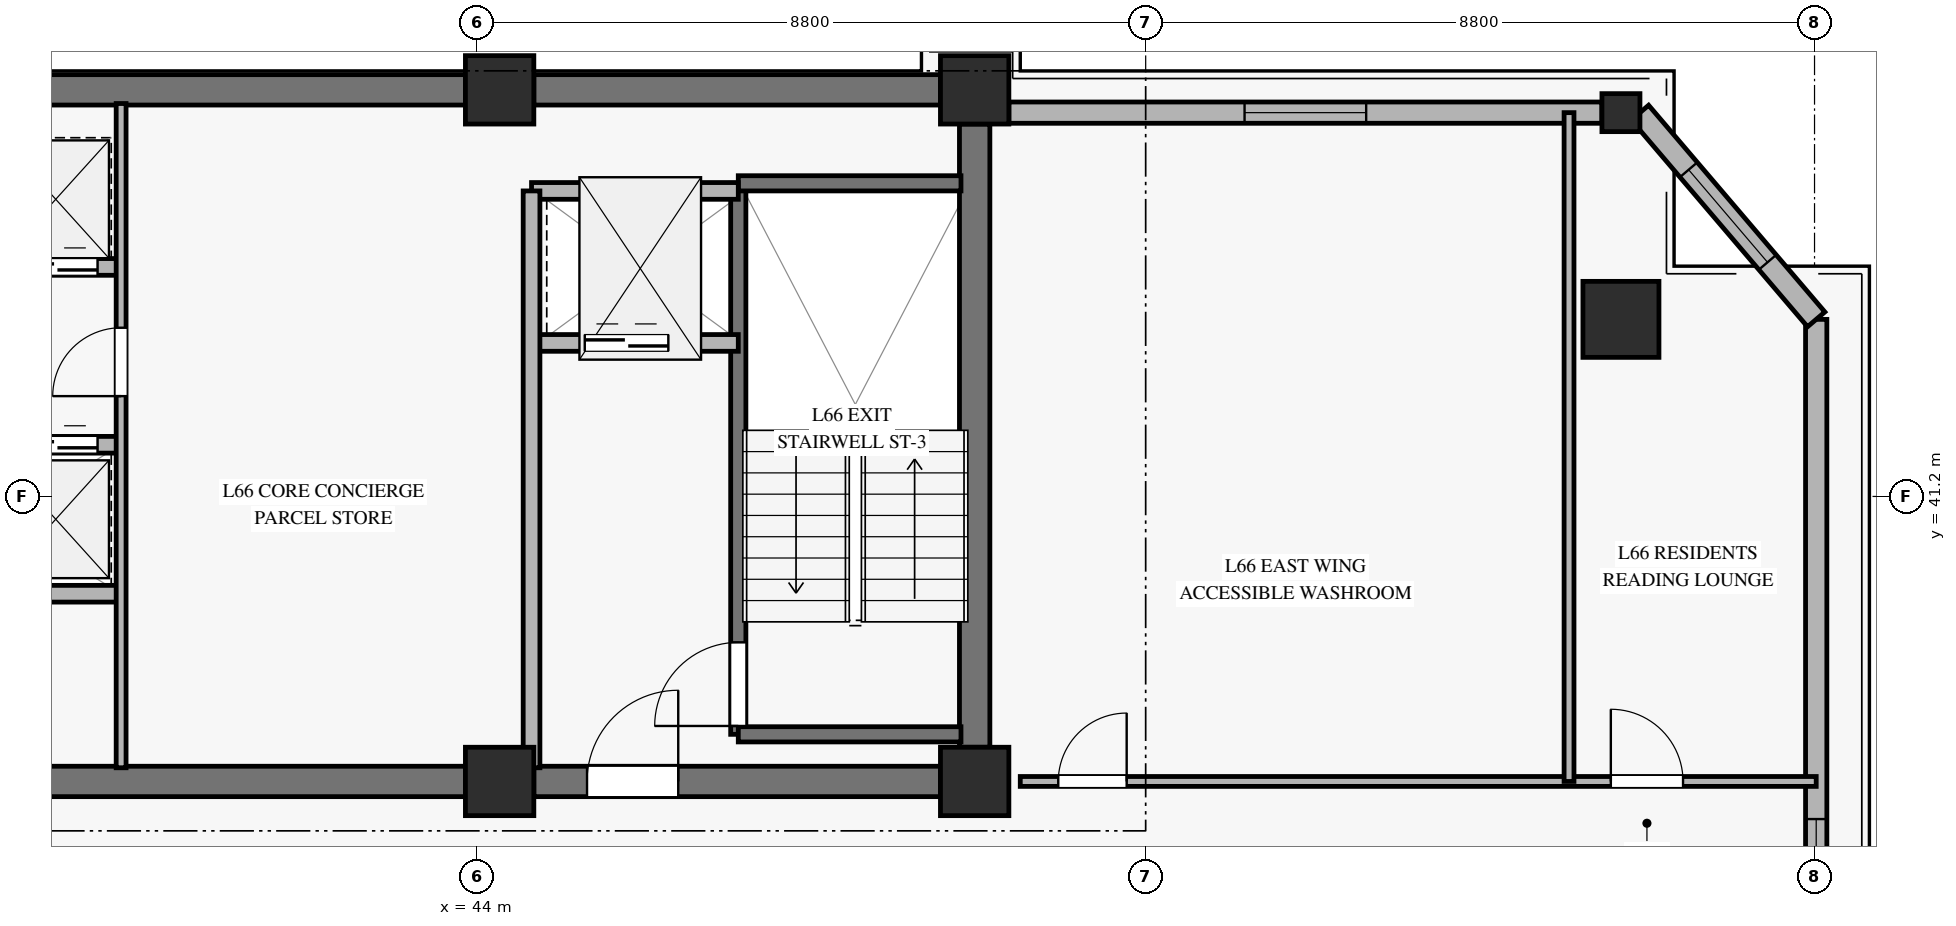
"""IFC4 building model, lengths in metres.
Left out: names, types, materials, properties, quantities, classifications, styles, units other than length and angle.
Written with IfcOpenShell. Run it as: python <this file> out.ifc"""

import sys

from ifc_helpers import new_model, si_unit, direction, frame, frame_2d, origin, origin_2d, place, context, subcontext, project, spatial, rectangle, hollow_rectangle, extrude, source, transform, mapped, element, fill, save


model = new_model("IFC4")
c1 = context("Model", 3, precision=1e-05, world=origin(), true_north=direction((0.0, 1.0)))
c2 = subcontext(c1, "Body", "Model", "MODEL_VIEW")
j1 = project(units=[si_unit("LENGTHUNIT", "METRE"), si_unit("PLANEANGLEUNIT", "RADIAN")], contexts=[c1])
p1 = place(None, origin())
s1 = spatial("IfcSite", under=j1, at=p1, CompositionType="ELEMENT")
p2 = place(p1, origin())
s2 = spatial("IfcBuilding", under=s1, at=p2, CompositionType="ELEMENT")
p3 = place(p2, frame((0.0, 0.0, 258.7)))
s3 = spatial("IfcBuildingStorey", under=s2, at=p3, CompositionType="ELEMENT", Elevation=258.7)
m1 = source(origin(), c2, "Body", "SweptSolid", [
    extrude(rectangle(XDim=0.9, YDim=0.9, at=origin_2d()), origin(), (0.0, 0.0, 1.0), 3.185),
])
for number, where, z_axis, x_axis in (
    (1, (44.3, 37.45, 0.0), (0.0, 0.0, 1.0), (1.0, 0.0, 0.0)),
    (2, (44.3, 46.55, 0.0), (0.0, 0.0, 1.0), (1.0, 0.0, 0.0)),
    (3, (50.55, 37.45, 0.0), (0.0, 0.0, 1.0), (1.0, 0.0, 0.0)),
    (4, (50.55, 46.55, 0.0), (0.0, 0.0, 1.0), (1.0, 0.0, 0.0)),
):
    element("IfcColumn", number, at=place(p3, frame(where, z_axis=z_axis, x_axis=x_axis)), inside=s3, PredefinedType="PILASTER", context=c2, shape_type="MappedRepresentation", body=[
        mapped(m1, transform((0.0, 0.0, 0.0), x_axis=(1.0, 0.0, 0.0), y_axis=(0.0, 1.0, 0.0), z_axis=(0.0, 0.0, 1.0), scale=1.0)),
    ])
p4 = place(p3, frame((36.05, 46.55, 0.0), z_axis=(0.0, 0.0, 1.0), x_axis=(1.0, 0.0, 0.0)))
e5 = element("IfcWall", 5, at=p4, inside=s3, PredefinedType="SHEAR", context=c2, shape_type="SweptSolid", body=[
    extrude(rectangle(XDim=7.8, YDim=0.4, at=frame_2d((3.9, 0.0))), origin(), (0.0, 0.0, 1.0), 3.185),
])
p5 = place(p3, frame((44.75, 46.55, 0.0), z_axis=(0.0, 0.0, 1.0), x_axis=(1.0, 0.0, 0.0)))
e6 = element("IfcWall", 6, at=p5, inside=s3, PredefinedType="SHEAR", context=c2, shape_type="SweptSolid", body=[
    extrude(rectangle(XDim=5.35, YDim=0.4, at=frame_2d((2.675, 0.0))), origin(), (0.0, 0.0, 1.0), 3.185),
])
p6 = place(p3, frame((36.05, 37.45, 0.0), z_axis=(0.0, 0.0, 1.0), x_axis=(1.0, 0.0, 0.0)))
e7 = element("IfcWall", 7, at=p6, inside=s3, PredefinedType="SHEAR", context=c2, shape_type="SweptSolid", body=[
    extrude(rectangle(XDim=7.8, YDim=0.4, at=frame_2d((3.9, 0.0))), origin(), (0.0, 0.0, 1.0), 3.185),
])
p7 = place(p3, frame((44.75, 37.45, 0.0), z_axis=(0.0, 0.0, 1.0), x_axis=(1.0, 0.0, 0.0)))
e8 = element("IfcWall", 8, at=p7, inside=s3, PredefinedType="SHEAR", context=c2, shape_type="SweptSolid", body=[
    extrude(rectangle(XDim=5.35, YDim=0.4, at=frame_2d((2.675, 0.0))), origin(), (0.0, 0.0, 1.0), 3.185),
])
p8 = place(p7, frame((0.7, 0.0, 0.0)))
e9 = element("IfcOpeningElement", 9, at=p8, cuts=e8, PredefinedType="OPENING", context=c2, shape_type="SweptSolid", body=[
    extrude(rectangle(XDim=1.2, YDim=2.15, at=frame_2d((0.6, 1.075))), frame((0.0, 0.21, 0.0), z_axis=(0.0, -1.0, 0.0), x_axis=(1.0, 0.0, 0.0)), (0.0, 0.0, 1.0), 0.42),
])
p9 = place(p3, frame((50.55, 37.9, 0.0), z_axis=(0.0, 0.0, 1.0), x_axis=(0.0, 1.0, 0.0)))
e10 = element("IfcWall", 10, at=p9, inside=s3, PredefinedType="SHEAR", context=c2, shape_type="SweptSolid", body=[
    extrude(rectangle(XDim=8.2, YDim=0.4, at=frame_2d((4.1, 0.0))), origin(), (0.0, 0.0, 1.0), 3.185),
])
m2 = source(origin(), c2, "Body", "SweptSolid", [
    extrude(hollow_rectangle(XDim=1.0, YDim=1.0, WallThickness=0.045, at=origin_2d()), origin(), (0.0, 0.0, 1.0), 3.185),
])
p10 = place(p3, frame((59.053, 43.53, 0.0), z_axis=(0.0, 0.0, 1.0), x_axis=(1.0, 0.0, 0.0)))
e11 = element("IfcColumn", 11, at=p10, inside=s3, PredefinedType="COLUMN", context=c2, shape_type="MappedRepresentation", body=[
    mapped(m2, transform((0.0, 0.0, 0.0), x_axis=(1.0, 0.0, 0.0), y_axis=(0.0, 1.0, 0.0), z_axis=(0.0, 0.0, 1.0), scale=1.0)),
])
m3 = source(origin(), c2, "Body", "SweptSolid", [
    extrude(hollow_rectangle(XDim=0.5, YDim=0.5, WallThickness=0.024, at=origin_2d()), origin(), (0.0, 0.0, 1.0), 3.185),
])
p11 = place(p3, frame((59.053, 46.25, 0.0), z_axis=(0.0, 0.0, 1.0), x_axis=(1.0, 0.0, 0.0)))
e12 = element("IfcColumn", 12, at=p11, inside=s3, PredefinedType="COLUMN", context=c2, shape_type="MappedRepresentation", body=[
    mapped(m3, transform((0.0, 0.0, 0.0), x_axis=(1.0, 0.0, 0.0), y_axis=(0.0, 1.0, 0.0), z_axis=(0.0, 0.0, 1.0), scale=1.0)),
])
p12 = place(p3, frame((61.622, 31.322, 0.0), z_axis=(0.0, 0.0, 1.0), x_axis=(0.0, 1.0, 0.0)))
e13 = element("IfcWall", 13, at=p12, inside=s3, PredefinedType="SOLIDWALL", context=c2, shape_type="SweptSolid", body=[
    extrude(rectangle(XDim=12.208, YDim=0.28, at=frame_2d((6.104, 0.0))), origin(), (0.0, 0.0, 1.0), 2.815),
])
p13 = place(p12, frame((4.033, 0.0, 0.45)))
e14 = element("IfcOpeningElement", 14, at=p13, cuts=e13, PredefinedType="OPENING", context=c2, shape_type="SweptSolid", body=[
    extrude(rectangle(XDim=1.6, YDim=2.0, at=frame_2d((0.8, 1.0))), frame((0.0, 0.15, 0.0), z_axis=(0.0, -1.0, 0.0), x_axis=(1.0, 0.0, 0.0)), (0.0, 0.0, 1.0), 0.3),
])
p14 = place(p3, frame((51.0, 46.25, 0.0), z_axis=(0.0, 0.0, 1.0), x_axis=(1.0, 0.0, 0.0)))
e15 = element("IfcWall", 15, at=p14, inside=s3, PredefinedType="SOLIDWALL", context=c2, shape_type="SweptSolid", body=[
    extrude(rectangle(XDim=7.803, YDim=0.28, at=frame_2d((3.901, 0.0))), origin(), (0.0, 0.0, 1.0), 2.815),
])
p15 = place(p14, frame((3.101, 0.0, 0.45)))
e16 = element("IfcOpeningElement", 16, at=p15, cuts=e15, PredefinedType="OPENING", context=c2, shape_type="SweptSolid", body=[
    extrude(rectangle(XDim=1.6, YDim=2.0, at=frame_2d((0.8, 1.0))), frame((0.0, 0.15, 0.0), z_axis=(0.0, -1.0, 0.0), x_axis=(1.0, 0.0, 0.0)), (0.0, 0.0, 1.0), 0.3),
])
p16 = place(p3, frame((61.622, 43.53, 0.0), z_axis=(0.0, 0.0, 1.0), x_axis=(-0.648803559951, 0.760955938669, 0.0)))
e17 = element("IfcWall", 17, at=p16, inside=s3, PredefinedType="SOLIDWALL", context=c2, shape_type="SweptSolid", body=[
    extrude(rectangle(XDim=3.574, YDim=0.3, at=frame_2d((1.787, 0.0))), origin(), (0.0, 0.0, 1.0), 2.815),
])
p17 = place(p16, frame((0.987, 0.0, 0.45)))
e18 = element("IfcOpeningElement", 18, at=p17, cuts=e17, PredefinedType="OPENING", context=c2, shape_type="SweptSolid", body=[
    extrude(rectangle(XDim=1.6, YDim=2.0, at=frame_2d((0.8, 1.0))), frame((0.0, 0.16, 0.0), z_axis=(0.0, -1.0, 0.0), x_axis=(1.0, 0.0, 0.0)), (0.0, 0.0, 1.0), 0.32),
])
p18 = place(p3, frame((47.44, 38.07, 0.0), z_axis=(0.0, 0.0, 1.0), x_axis=(0.0, 1.0, 0.0)))
e19 = element("IfcWall", 19, at=p18, inside=s3, PredefinedType="SOLIDWALL", context=c2, shape_type="SweptSolid", body=[
    extrude(rectangle(XDim=7.25, YDim=0.2, at=frame_2d((3.625, 0.0))), origin(), (0.0, 0.0, 1.0), 3.4),
])
p19 = place(p18, frame((0.11, 0.0, 0.0)))
e20 = element("IfcOpeningElement", 20, at=p19, cuts=e19, PredefinedType="OPENING", context=c2, shape_type="SweptSolid", body=[
    extrude(rectangle(XDim=1.1, YDim=2.15, at=frame_2d((0.55, 1.075))), frame((0.0, 0.11, 0.0), z_axis=(0.0, -1.0, 0.0), x_axis=(1.0, 0.0, 0.0)), (0.0, 0.0, 1.0), 0.22),
])
for number, where, z_axis, x_axis in (
    (21, (47.44, 45.32, 0.0), (0.0, 0.0, 1.0), (1.0, 0.0, 0.0)),
    (22, (47.44, 38.07, 0.0), (0.0, 0.0, 1.0), (1.0, 0.0, 0.0)),
):
    element("IfcWall", number, at=place(p3, frame(where, z_axis=z_axis, x_axis=x_axis)), inside=s3, PredefinedType="SOLIDWALL", context=c2, shape_type="SweptSolid", body=[
        extrude(rectangle(XDim=2.93, YDim=0.2, at=frame_2d((1.465, 0.0))), origin(), (0.0, 0.0, 1.0), 3.4),
    ])
p20 = place(p3, frame((44.72, 43.22, 0.0), z_axis=(0.0, 0.0, 1.0), x_axis=(1.0, 0.0, 0.0)))
e23 = element("IfcWall", 23, at=p20, inside=s3, PredefinedType="SOLIDWALL", context=c2, shape_type="SweptSolid", body=[
    extrude(rectangle(XDim=2.72, YDim=0.22, at=frame_2d((1.36, 0.0))), origin(), (0.0, 0.0, 1.0), 3.185),
])
p21 = place(p20, frame((0.7, 0.0, 0.0)))
e24 = element("IfcOpeningElement", 24, at=p21, cuts=e23, PredefinedType="OPENING", context=c2, shape_type="SweptSolid", body=[
    extrude(rectangle(XDim=1.1, YDim=2.2, at=frame_2d((0.55, 1.1))), frame((0.0, 0.12, 0.0), z_axis=(0.0, -1.0, 0.0), x_axis=(1.0, 0.0, 0.0)), (0.0, 0.0, 1.0), 0.24),
])
p22 = place(p3, frame((44.72, 45.22, 0.0), z_axis=(0.0, 0.0, 1.0), x_axis=(1.0, 0.0, 0.0)))
e25 = element("IfcWall", 25, at=p22, inside=s3, PredefinedType="SOLIDWALL", context=c2, shape_type="SweptSolid", body=[
    extrude(rectangle(XDim=2.72, YDim=0.22, at=frame_2d((1.36, 0.0))), origin(), (0.0, 0.0, 1.0), 3.185),
])
p23 = place(p3, frame((44.72, 37.63, 0.0), z_axis=(0.0, 0.0, 1.0), x_axis=(0.0, 1.0, 0.0)))
e26 = element("IfcWall", 26, at=p23, inside=s3, PredefinedType="SOLIDWALL", context=c2, shape_type="SweptSolid", body=[
    extrude(rectangle(XDim=7.59, YDim=0.22, at=frame_2d((3.795, 0.0))), origin(), (0.0, 0.0, 1.0), 3.185),
])
p24 = place(p3, frame((36.12, 44.22, 0.0), z_axis=(0.0, 0.0, 1.0), x_axis=(1.0, 0.0, 0.0)))
e27 = element("IfcWall", 27, at=p24, inside=s3, PredefinedType="SOLIDWALL", context=c2, shape_type="SweptSolid", body=[
    extrude(rectangle(XDim=3.2, YDim=0.22, at=frame_2d((1.6, 0.0))), origin(), (0.0, 0.0, 1.0), 3.185),
])
p25 = place(p24, frame((0.3, 0.0, 0.0)))
e28 = element("IfcOpeningElement", 28, at=p25, cuts=e27, PredefinedType="OPENING", context=c2, shape_type="SweptSolid", body=[
    extrude(rectangle(XDim=1.1, YDim=2.2, at=frame_2d((0.55, 1.1))), frame((0.0, 0.12, 0.0), z_axis=(0.0, -1.0, 0.0), x_axis=(1.0, 0.0, 0.0)), (0.0, 0.0, 1.0), 0.24),
])
p26 = place(p24, frame((1.79, 0.0, 0.0)))
e29 = element("IfcOpeningElement", 29, at=p26, cuts=e27, PredefinedType="OPENING", context=c2, shape_type="SweptSolid", body=[
    extrude(rectangle(XDim=1.1, YDim=2.2, at=frame_2d((0.55, 1.1))), frame((0.0, 0.12, 0.0), z_axis=(0.0, -1.0, 0.0), x_axis=(1.0, 0.0, 0.0)), (0.0, 0.0, 1.0), 0.24),
])
p27 = place(p3, frame((36.12, 41.88, 0.0), z_axis=(0.0, 0.0, 1.0), x_axis=(1.0, 0.0, 0.0)))
e30 = element("IfcWall", 30, at=p27, inside=s3, PredefinedType="SOLIDWALL", context=c2, shape_type="SweptSolid", body=[
    extrude(rectangle(XDim=3.2, YDim=0.22, at=frame_2d((1.6, 0.0))), origin(), (0.0, 0.0, 1.0), 3.185),
])
p28 = place(p27, frame((0.3, 0.0, 0.0)))
e31 = element("IfcOpeningElement", 31, at=p28, cuts=e30, PredefinedType="OPENING", context=c2, shape_type="SweptSolid", body=[
    extrude(rectangle(XDim=1.1, YDim=2.2, at=frame_2d((0.55, 1.1))), frame((0.0, 0.12, 0.0), z_axis=(0.0, -1.0, 0.0), x_axis=(1.0, 0.0, 0.0)), (0.0, 0.0, 1.0), 0.24),
])
p29 = place(p27, frame((1.79, 0.0, 0.0)))
e32 = element("IfcOpeningElement", 32, at=p29, cuts=e30, PredefinedType="OPENING", context=c2, shape_type="SweptSolid", body=[
    extrude(rectangle(XDim=1.1, YDim=2.2, at=frame_2d((0.55, 1.1))), frame((0.0, 0.12, 0.0), z_axis=(0.0, -1.0, 0.0), x_axis=(1.0, 0.0, 0.0)), (0.0, 0.0, 1.0), 0.24),
])
p30 = place(p3, frame((36.12, 39.92, 0.0), z_axis=(0.0, 0.0, 1.0), x_axis=(1.0, 0.0, 0.0)))
e33 = element("IfcWall", 33, at=p30, inside=s3, PredefinedType="SOLIDWALL", context=c2, shape_type="SweptSolid", body=[
    extrude(rectangle(XDim=3.2, YDim=0.22, at=frame_2d((1.6, 0.0))), origin(), (0.0, 0.0, 1.0), 3.185),
])
p31 = place(p3, frame((39.32, 37.63, 0.0), z_axis=(0.0, 0.0, 1.0), x_axis=(0.0, 1.0, 0.0)))
e34 = element("IfcWall", 34, at=p31, inside=s3, PredefinedType="PARTITIONING", context=c2, shape_type="SweptSolid", body=[
    extrude(rectangle(XDim=8.74, YDim=0.13, at=frame_2d((4.37, 0.0))), origin(), (0.0, 0.0, 1.0), 3.185),
])
p32 = place(p31, frame((4.89, 0.0, 0.0)))
e35 = element("IfcOpeningElement", 35, at=p32, cuts=e34, PredefinedType="OPENING", context=c2, shape_type="SweptSolid", body=[
    extrude(rectangle(XDim=0.9, YDim=2.1, at=frame_2d((0.45, 1.05))), frame((0.0, 0.075, 0.0), z_axis=(0.0, -1.0, 0.0), x_axis=(1.0, 0.0, 0.0)), (0.0, 0.0, 1.0), 0.15),
])
p33 = place(p3, frame((51.15, 37.45, 0.0), z_axis=(0.0, 0.0, 1.0), x_axis=(1.0, 0.0, 0.0)))
e36 = element("IfcWall", 36, at=p33, inside=s3, PredefinedType="PARTITIONING", context=c2, shape_type="SweptSolid", body=[
    extrude(rectangle(XDim=10.472, YDim=0.13, at=frame_2d((5.236, 0.0))), origin(), (0.0, 0.0, 1.0), 2.82),
])
p34 = place(p33, frame((0.5, 0.0, 0.0)))
e37 = element("IfcOpeningElement", 37, at=p34, cuts=e36, PredefinedType="OPENING", context=c2, shape_type="SweptSolid", body=[
    extrude(rectangle(XDim=0.9, YDim=2.1, at=frame_2d((0.45, 1.05))), frame((0.0, 0.075, 0.0), z_axis=(0.0, -1.0, 0.0), x_axis=(1.0, 0.0, 0.0)), (0.0, 0.0, 1.0), 0.15),
])
p35 = place(p33, frame((7.77, 0.0, 0.0)))
e38 = element("IfcOpeningElement", 38, at=p35, cuts=e36, PredefinedType="OPENING", context=c2, shape_type="SweptSolid", body=[
    extrude(rectangle(XDim=0.95, YDim=2.1, at=frame_2d((0.475, 1.05))), frame((0.0, 0.075, 0.0), z_axis=(0.0, -1.0, 0.0), x_axis=(1.0, 0.0, 0.0)), (0.0, 0.0, 1.0), 0.15),
])
p36 = place(p3, frame((58.37, 37.45, 0.0), z_axis=(0.0, 0.0, 1.0), x_axis=(0.0, 1.0, 0.0)))
e39 = element("IfcWall", 39, at=p36, inside=s3, PredefinedType="PARTITIONING", context=c2, shape_type="SweptSolid", body=[
    extrude(rectangle(XDim=8.8, YDim=0.13, at=frame_2d((4.4, 0.0))), origin(), (0.0, 0.0, 1.0), 3.185),
])
m4 = source(origin(), c2, "Body", "SweptSolid", [
    extrude(rectangle(XDim=1.6, YDim=2.0, at=frame_2d((0.8, 1.0))), frame((0.0, 0.03, 0.0), z_axis=(0.0, -1.0, 0.0), x_axis=(1.0, 0.0, 0.0)), (0.0, 0.0, 1.0), 0.06),
])
p37 = place(p13, origin())
e40 = element("IfcWindow", 40, at=p37, inside=s3, PartitioningType="SINGLE_PANEL", PredefinedType="WINDOW", context=c2, shape_type="MappedRepresentation", body=[
    mapped(m4, transform((0.0, 0.0, 0.0), x_axis=(1.0, 0.0, 0.0), y_axis=(0.0, 1.0, 0.0), z_axis=(0.0, 0.0, 1.0), scale=1.0)),
])
fill(e14, e40)
p38 = place(p15, origin())
e41 = element("IfcWindow", 41, at=p38, inside=s3, PartitioningType="SINGLE_PANEL", PredefinedType="WINDOW", context=c2, shape_type="MappedRepresentation", body=[
    mapped(m4, transform((0.0, 0.0, 0.0), x_axis=(1.0, 0.0, 0.0), y_axis=(0.0, 1.0, 0.0), z_axis=(0.0, 0.0, 1.0), scale=1.0)),
])
fill(e16, e41)
p39 = place(p17, origin())
e42 = element("IfcWindow", 42, at=p39, inside=s3, PartitioningType="SINGLE_PANEL", PredefinedType="WINDOW", context=c2, shape_type="MappedRepresentation", body=[
    mapped(m4, transform((0.0, 0.0, 0.0), x_axis=(1.0, 0.0, 0.0), y_axis=(0.0, 1.0, 0.0), z_axis=(0.0, 0.0, 1.0), scale=1.0)),
])
fill(e18, e42)
m5 = source(origin(), c2, "Body", "SweptSolid", [
    extrude(rectangle(XDim=1.1, YDim=2.15, at=frame_2d((0.55, 1.075))), frame((0.0, 0.025, 0.0), z_axis=(0.0, -1.0, 0.0), x_axis=(1.0, 0.0, 0.0)), (0.0, 0.0, 1.0), 0.05),
])
p40 = place(p19, origin())
e43 = element("IfcDoor", 43, at=p40, inside=s3, OperationType="SINGLE_SWING_LEFT", PredefinedType="DOOR", context=c2, shape_type="MappedRepresentation", body=[
    mapped(m5, transform((0.0, 0.0, 0.0), x_axis=(1.0, 0.0, 0.0), y_axis=(0.0, 1.0, 0.0), z_axis=(0.0, 0.0, 1.0), scale=1.0)),
])
fill(e20, e43)
m6 = source(origin(), c2, "Body", "SweptSolid", [
    extrude(rectangle(XDim=1.1, YDim=2.2, at=frame_2d((0.55, 1.1))), frame((0.0, 0.025, 0.0), z_axis=(0.0, -1.0, 0.0), x_axis=(1.0, 0.0, 0.0)), (0.0, 0.0, 1.0), 0.05),
])
p41 = place(p21, origin())
e44 = element("IfcDoor", 44, at=p41, inside=s3, OperationType="SLIDING_TO_LEFT", PredefinedType="DOOR", context=c2, shape_type="MappedRepresentation", body=[
    mapped(m6, transform((0.0, 0.0, 0.0), x_axis=(1.0, 0.0, 0.0), y_axis=(0.0, 1.0, 0.0), z_axis=(0.0, 0.0, 1.0), scale=1.0)),
])
fill(e24, e44)
m7 = source(origin(), c2, "Body", "SweptSolid", [
    extrude(rectangle(XDim=1.2, YDim=2.15, at=frame_2d((0.6, 1.075))), frame((0.0, 0.025, 0.0), z_axis=(0.0, -1.0, 0.0), x_axis=(1.0, 0.0, 0.0)), (0.0, 0.0, 1.0), 0.05),
])
p42 = place(p8, origin())
e45 = element("IfcDoor", 45, at=p42, inside=s3, OperationType="SINGLE_SWING_RIGHT", PredefinedType="DOOR", context=c2, shape_type="MappedRepresentation", body=[
    mapped(m7, transform((0.0, 0.0, 0.0), x_axis=(1.0, 0.0, 0.0), y_axis=(0.0, 1.0, 0.0), z_axis=(0.0, 0.0, 1.0), scale=1.0)),
])
fill(e9, e45)
p43 = place(p26, origin())
e46 = element("IfcDoor", 46, at=p43, inside=s3, OperationType="SLIDING_TO_LEFT", PredefinedType="DOOR", context=c2, shape_type="MappedRepresentation", body=[
    mapped(m6, transform((0.0, 0.0, 0.0), x_axis=(1.0, 0.0, 0.0), y_axis=(0.0, 1.0, 0.0), z_axis=(0.0, 0.0, 1.0), scale=1.0)),
])
fill(e29, e46)
p44 = place(p29, origin())
e47 = element("IfcDoor", 47, at=p44, inside=s3, OperationType="SLIDING_TO_LEFT", PredefinedType="DOOR", context=c2, shape_type="MappedRepresentation", body=[
    mapped(m6, transform((0.0, 0.0, 0.0), x_axis=(1.0, 0.0, 0.0), y_axis=(0.0, 1.0, 0.0), z_axis=(0.0, 0.0, 1.0), scale=1.0)),
])
fill(e32, e47)
m8 = source(origin(), c2, "Body", "SweptSolid", [
    extrude(rectangle(XDim=0.9, YDim=2.1, at=frame_2d((0.45, 1.05))), frame((0.0, 0.025, 0.0), z_axis=(0.0, -1.0, 0.0), x_axis=(1.0, 0.0, 0.0)), (0.0, 0.0, 1.0), 0.05),
])
p45 = place(p32, origin())
e48 = element("IfcDoor", 48, at=p45, inside=s3, OperationType="SINGLE_SWING_LEFT", PredefinedType="DOOR", context=c2, shape_type="MappedRepresentation", body=[
    mapped(m8, transform((0.0, 0.0, 0.0), x_axis=(1.0, 0.0, 0.0), y_axis=(0.0, 1.0, 0.0), z_axis=(0.0, 0.0, 1.0), scale=1.0)),
])
fill(e35, e48)
p46 = place(p34, origin())
e49 = element("IfcDoor", 49, at=p46, inside=s3, OperationType="SINGLE_SWING_RIGHT", PredefinedType="DOOR", context=c2, shape_type="MappedRepresentation", body=[
    mapped(m8, transform((0.0, 0.0, 0.0), x_axis=(1.0, 0.0, 0.0), y_axis=(0.0, 1.0, 0.0), z_axis=(0.0, 0.0, 1.0), scale=1.0)),
])
fill(e37, e49)
m9 = source(origin(), c2, "Body", "SweptSolid", [
    extrude(rectangle(XDim=0.95, YDim=2.1, at=frame_2d((0.475, 1.05))), frame((0.0, 0.025, 0.0), z_axis=(0.0, -1.0, 0.0), x_axis=(1.0, 0.0, 0.0)), (0.0, 0.0, 1.0), 0.05),
])
p47 = place(p35, origin())
e50 = element("IfcDoor", 50, at=p47, inside=s3, OperationType="SINGLE_SWING_LEFT", PredefinedType="DOOR", context=c2, shape_type="MappedRepresentation", body=[
    mapped(m9, transform((0.0, 0.0, 0.0), x_axis=(1.0, 0.0, 0.0), y_axis=(0.0, 1.0, 0.0), z_axis=(0.0, 0.0, 1.0), scale=1.0)),
])
fill(e38, e50)
save(model, sys.argv[1])
